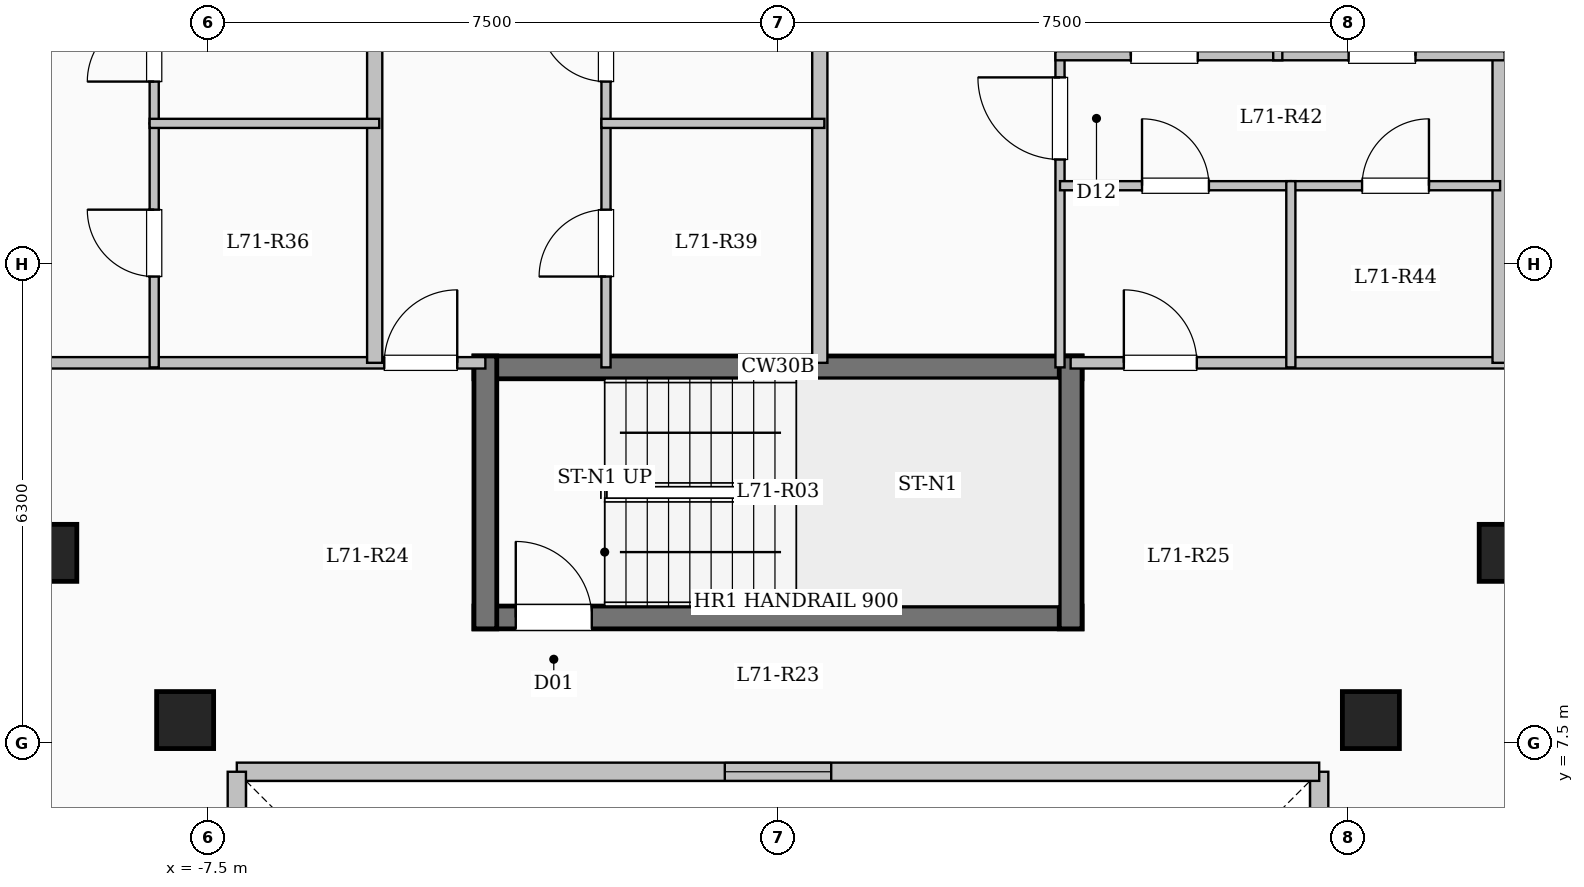
"""IFC4 building model, lengths in metres.
Left out: names, types, materials, properties, quantities, classifications, styles, units other than length and angle.
Written with IfcOpenShell. Run it as: python <this file> out.ifc"""

import sys

from ifc_helpers import new_model, si_unit, direction, frame, frame_2d, origin, origin_2d, place, context, subcontext, project, spatial, rectangle, extrude, element, fill, save


model = new_model("IFC4")
c1 = context("Model", 3, precision=1e-05, world=origin(), true_north=direction((0.0, 1.0)))
c2 = subcontext(c1, "Body", "Model", "MODEL_VIEW")
j1 = project(units=[si_unit("LENGTHUNIT", "METRE"), si_unit("PLANEANGLEUNIT", "RADIAN")], contexts=[c1])
p1 = place(None, origin())
s1 = spatial("IfcSite", under=j1, at=p1, CompositionType="ELEMENT")
p2 = place(p1, origin())
s2 = spatial("IfcBuilding", under=s1, at=p2, CompositionType="ELEMENT")
p3 = place(p2, frame((0.0, 0.0, 261.6)))
s3 = spatial("IfcBuildingStorey", under=s2, at=p3, CompositionType="ELEMENT", Elevation=261.6)
for number, where, z_axis, x_axis in (
    (1, (-7.8, 7.8, 0.0), (0.0, 0.0, 1.0), (1.0, 0.0, 0.0)),
    (2, (7.8, 7.8, 0.0), (0.0, 0.0, 1.0), (1.0, 0.0, 0.0)),
    (3, (-9.6, 10.0, 0.0), (0.0, 0.0, 1.0), (1.0, 0.0, 0.0)),
    (4, (9.6, 10.0, 0.0), (0.0, 0.0, 1.0), (1.0, 0.0, 0.0)),
):
    element("IfcColumn", number, at=place(p3, frame(where, z_axis=z_axis, x_axis=x_axis)), inside=s3, PredefinedType="COLUMN", context=c2, shape_type="SweptSolid", body=[
        extrude(rectangle(XDim=0.75, YDim=0.75, at=origin_2d()), origin(), (0.0, 0.0, 1.0), 3.35),
    ])
p4 = place(p3, frame((7.12, -7.12, 0.0), z_axis=(0.0, 0.0, 1.0), x_axis=(0.0, 1.0, 0.0)))
e5 = element("IfcWall", 5, at=p4, inside=s3, PredefinedType="SOLIDWALL", context=c2, shape_type="SweptSolid", body=[
    extrude(rectangle(XDim=14.24, YDim=0.24, at=frame_2d((7.12, 0.0))), origin(), (0.0, 0.0, 1.0), 3.1),
])
p5 = place(p4, frame((6.42, 0.0, 0.95)))
e6 = element("IfcOpeningElement", 6, at=p5, cuts=e5, PredefinedType="OPENING", context=c2, shape_type="SweptSolid", body=[
    extrude(rectangle(XDim=1.4, YDim=1.5, at=frame_2d((0.7, 0.75))), frame((0.0, 0.13, 0.0), z_axis=(0.0, -1.0, 0.0), x_axis=(1.0, 0.0, 0.0)), (0.0, 0.0, 1.0), 0.26),
])
p6 = place(p3, frame((7.12, 7.12, 0.0), z_axis=(0.0, 0.0, 1.0), x_axis=(-1.0, 0.0, 0.0)))
e7 = element("IfcWall", 7, at=p6, inside=s3, PredefinedType="SOLIDWALL", context=c2, shape_type="SweptSolid", body=[
    extrude(rectangle(XDim=14.24, YDim=0.24, at=frame_2d((7.12, 0.0))), origin(), (0.0, 0.0, 1.0), 3.1),
])
p7 = place(p6, frame((6.42, 0.0, 0.95)))
e8 = element("IfcOpeningElement", 8, at=p7, cuts=e7, PredefinedType="OPENING", context=c2, shape_type="SweptSolid", body=[
    extrude(rectangle(XDim=1.4, YDim=1.5, at=frame_2d((0.7, 0.75))), frame((0.0, 0.13, 0.0), z_axis=(0.0, -1.0, 0.0), x_axis=(1.0, 0.0, 0.0)), (0.0, 0.0, 1.0), 0.26),
])
p8 = place(p3, frame((-7.12, 7.12, 0.0), z_axis=(0.0, 0.0, 1.0), x_axis=(0.0, -1.0, 0.0)))
e9 = element("IfcWall", 9, at=p8, inside=s3, PredefinedType="SOLIDWALL", context=c2, shape_type="SweptSolid", body=[
    extrude(rectangle(XDim=14.24, YDim=0.24, at=frame_2d((7.12, 0.0))), origin(), (0.0, 0.0, 1.0), 3.1),
])
p9 = place(p8, frame((6.42, 0.0, 0.95)))
e10 = element("IfcOpeningElement", 10, at=p9, cuts=e9, PredefinedType="OPENING", context=c2, shape_type="SweptSolid", body=[
    extrude(rectangle(XDim=1.4, YDim=1.5, at=frame_2d((0.7, 0.75))), frame((0.0, 0.13, 0.0), z_axis=(0.0, -1.0, 0.0), x_axis=(1.0, 0.0, 0.0)), (0.0, 0.0, 1.0), 0.26),
])
p10 = place(p3, frame((-4.0, 12.44, 0.0), z_axis=(0.0, 0.0, 1.0), x_axis=(1.0, 0.0, 0.0)))
e11 = element("IfcWall", 11, at=p10, inside=s3, PredefinedType="SHEAR", context=c2, shape_type="SweptSolid", body=[
    extrude(rectangle(XDim=8.0, YDim=0.3, at=frame_2d((4.0, 0.0))), origin(), (0.0, 0.0, 1.0), 3.35),
])
p11 = place(p3, frame((-4.0, 9.15, 0.0), z_axis=(0.0, 0.0, 1.0), x_axis=(1.0, 0.0, 0.0)))
e12 = element("IfcWall", 12, at=p11, inside=s3, PredefinedType="SHEAR", context=c2, shape_type="SweptSolid", body=[
    extrude(rectangle(XDim=8.0, YDim=0.3, at=frame_2d((4.0, 0.0))), origin(), (0.0, 0.0, 1.0), 3.35),
])
p12 = place(p11, frame((0.55, 0.0, 0.0)))
e13 = element("IfcOpeningElement", 13, at=p12, cuts=e12, PredefinedType="OPENING", context=c2, shape_type="SweptSolid", body=[
    extrude(rectangle(XDim=1.0, YDim=2.15, at=frame_2d((0.5, 1.075))), frame((0.0, 0.16, 0.0), z_axis=(0.0, -1.0, 0.0), x_axis=(1.0, 0.0, 0.0)), (0.0, 0.0, 1.0), 0.32),
])
for number, where, z_axis, x_axis in (
    (14, (-3.85, 9.0, 0.0), (0.0, 0.0, 1.0), (0.0, 1.0, 0.0)),
    (15, (3.85, 9.0, 0.0), (0.0, 0.0, 1.0), (0.0, 1.0, 0.0)),
):
    element("IfcWall", number, at=place(p3, frame(where, z_axis=z_axis, x_axis=x_axis)), inside=s3, PredefinedType="SHEAR", context=c2, shape_type="SweptSolid", body=[
        extrude(rectangle(XDim=3.59, YDim=0.3, at=frame_2d((1.795, 0.0))), origin(), (0.0, 0.0, 1.0), 3.35),
    ])
p13 = place(p3, frame((-17.75, 12.5, 0.0), z_axis=(0.0, 0.0, 1.0), x_axis=(1.0, 0.0, 0.0)))
e16 = element("IfcWall", 16, at=p13, inside=s3, PredefinedType="PARTITIONING", context=c2, shape_type="SweptSolid", body=[
    extrude(rectangle(XDim=13.9, YDim=0.15, at=frame_2d((6.95, 0.0))), origin(), (0.0, 0.0, 1.0), 3.1),
])
p14 = place(p13, frame((0.7, 0.0, 0.0)))
e17 = element("IfcOpeningElement", 17, at=p14, cuts=e16, PredefinedType="OPENING", context=c2, shape_type="SweptSolid", body=[
    extrude(rectangle(XDim=0.96, YDim=2.15, at=frame_2d((0.48, 1.075))), frame((0.0, 0.085, 0.0), z_axis=(0.0, -1.0, 0.0), x_axis=(1.0, 0.0, 0.0)), (0.0, 0.0, 1.0), 0.17),
])
p15 = place(p13, frame((7.105, 0.0, 0.0)))
e18 = element("IfcOpeningElement", 18, at=p15, cuts=e16, PredefinedType="OPENING", context=c2, shape_type="SweptSolid", body=[
    extrude(rectangle(XDim=0.96, YDim=2.15, at=frame_2d((0.48, 1.075))), frame((0.0, 0.085, 0.0), z_axis=(0.0, -1.0, 0.0), x_axis=(1.0, 0.0, 0.0)), (0.0, 0.0, 1.0), 0.17),
])
p16 = place(p13, frame((12.57, 0.0, 0.0)))
e19 = element("IfcOpeningElement", 19, at=p16, cuts=e16, PredefinedType="OPENING", context=c2, shape_type="SweptSolid", body=[
    extrude(rectangle(XDim=0.96, YDim=2.15, at=frame_2d((0.48, 1.075))), frame((0.0, 0.085, 0.0), z_axis=(0.0, -1.0, 0.0), x_axis=(1.0, 0.0, 0.0)), (0.0, 0.0, 1.0), 0.17),
])
p17 = place(p3, frame((3.85, 12.5, 0.0), z_axis=(0.0, 0.0, 1.0), x_axis=(1.0, 0.0, 0.0)))
e20 = element("IfcWall", 20, at=p17, inside=s3, PredefinedType="PARTITIONING", context=c2, shape_type="SweptSolid", body=[
    extrude(rectangle(XDim=13.9, YDim=0.15, at=frame_2d((6.95, 0.0))), origin(), (0.0, 0.0, 1.0), 3.1),
])
p18 = place(p17, frame((0.7, 0.0, 0.0)))
e21 = element("IfcOpeningElement", 21, at=p18, cuts=e20, PredefinedType="OPENING", context=c2, shape_type="SweptSolid", body=[
    extrude(rectangle(XDim=0.96, YDim=2.15, at=frame_2d((0.48, 1.075))), frame((0.0, 0.085, 0.0), z_axis=(0.0, -1.0, 0.0), x_axis=(1.0, 0.0, 0.0)), (0.0, 0.0, 1.0), 0.17),
])
p19 = place(p17, frame((6.35, 0.0, 0.0)))
e22 = element("IfcOpeningElement", 22, at=p19, cuts=e20, PredefinedType="OPENING", context=c2, shape_type="SweptSolid", body=[
    extrude(rectangle(XDim=0.96, YDim=2.15, at=frame_2d((0.48, 1.075))), frame((0.0, 0.085, 0.0), z_axis=(0.0, -1.0, 0.0), x_axis=(1.0, 0.0, 0.0)), (0.0, 0.0, 1.0), 0.17),
])
p20 = place(p3, frame((0.55, 12.5, 0.0), z_axis=(0.0, 0.0, 1.0), x_axis=(0.0, 1.0, 0.0)))
e23 = element("IfcWall", 23, at=p20, inside=s3, PredefinedType="SOLIDWALL", context=c2, shape_type="SweptSolid", body=[
    extrude(rectangle(XDim=9.88, YDim=0.2, at=frame_2d((4.94, 0.0))), origin(), (0.0, 0.0, 1.0), 3.1),
])
p21 = place(p3, frame((-5.306, 12.5, 0.0), z_axis=(0.0, 0.0, 1.0), x_axis=(0.0, 1.0, 0.0)))
e24 = element("IfcWall", 24, at=p21, inside=s3, PredefinedType="SOLIDWALL", context=c2, shape_type="SweptSolid", body=[
    extrude(rectangle(XDim=9.805, YDim=0.2, at=frame_2d((4.902, 0.0))), origin(), (0.0, 0.0, 1.0), 3.1),
])
p22 = place(p3, frame((-8.207, 12.44, 0.0), z_axis=(0.0, 0.0, 1.0), x_axis=(0.0, 1.0, 0.0)))
e25 = element("IfcWall", 25, at=p22, inside=s3, PredefinedType="PARTITIONING", context=c2, shape_type="SweptSolid", body=[
    extrude(rectangle(XDim=3.21, YDim=0.12, at=frame_2d((1.605, 0.0))), origin(), (0.0, 0.0, 1.0), 3.1),
])
p23 = place(p22, frame((1.195, 0.0, 0.0)))
e26 = element("IfcOpeningElement", 26, at=p23, cuts=e25, PredefinedType="OPENING", context=c2, shape_type="SweptSolid", body=[
    extrude(rectangle(XDim=0.88, YDim=2.1, at=frame_2d((0.44, 1.05))), frame((0.0, 0.07, 0.0), z_axis=(0.0, -1.0, 0.0), x_axis=(1.0, 0.0, 0.0)), (0.0, 0.0, 1.0), 0.14),
])
p24 = place(p3, frame((-8.207, 15.65, 0.0), z_axis=(0.0, 0.0, 1.0), x_axis=(0.0, 1.0, 0.0)))
e27 = element("IfcWall", 27, at=p24, inside=s3, PredefinedType="PARTITIONING", context=c2, shape_type="SweptSolid", body=[
    extrude(rectangle(XDim=5.939, YDim=0.12, at=frame_2d((2.97, 0.0))), origin(), (0.0, 0.0, 1.0), 3.1),
])
p25 = place(p24, frame((0.55, 0.0, 0.0)))
e28 = element("IfcOpeningElement", 28, at=p25, cuts=e27, PredefinedType="OPENING", context=c2, shape_type="SweptSolid", body=[
    extrude(rectangle(XDim=0.88, YDim=2.1, at=frame_2d((0.44, 1.05))), frame((0.0, 0.07, 0.0), z_axis=(0.0, -1.0, 0.0), x_axis=(1.0, 0.0, 0.0)), (0.0, 0.0, 1.0), 0.14),
])
p26 = place(p3, frame((-8.267, 15.65, 0.0), z_axis=(0.0, 0.0, 1.0), x_axis=(1.0, 0.0, 0.0)))
e29 = element("IfcWall", 29, at=p26, inside=s3, PredefinedType="PARTITIONING", context=c2, shape_type="SweptSolid", body=[
    extrude(rectangle(XDim=3.021, YDim=0.12, at=frame_2d((1.51, 0.0))), origin(), (0.0, 0.0, 1.0), 2.785),
])
p27 = place(p3, frame((-2.263, 12.44, 0.0), z_axis=(0.0, 0.0, 1.0), x_axis=(0.0, 1.0, 0.0)))
e30 = element("IfcWall", 30, at=p27, inside=s3, PredefinedType="PARTITIONING", context=c2, shape_type="SweptSolid", body=[
    extrude(rectangle(XDim=3.21, YDim=0.12, at=frame_2d((1.605, 0.0))), origin(), (0.0, 0.0, 1.0), 3.1),
])
p28 = place(p27, frame((1.195, 0.0, 0.0)))
e31 = element("IfcOpeningElement", 31, at=p28, cuts=e30, PredefinedType="OPENING", context=c2, shape_type="SweptSolid", body=[
    extrude(rectangle(XDim=0.88, YDim=2.1, at=frame_2d((0.44, 1.05))), frame((0.0, 0.07, 0.0), z_axis=(0.0, -1.0, 0.0), x_axis=(1.0, 0.0, 0.0)), (0.0, 0.0, 1.0), 0.14),
])
p29 = place(p3, frame((-2.263, 15.65, 0.0), z_axis=(0.0, 0.0, 1.0), x_axis=(0.0, 1.0, 0.0)))
e32 = element("IfcWall", 32, at=p29, inside=s3, PredefinedType="PARTITIONING", context=c2, shape_type="SweptSolid", body=[
    extrude(rectangle(XDim=6.73, YDim=0.12, at=frame_2d((3.365, 0.0))), origin(), (0.0, 0.0, 1.0), 3.1),
])
p30 = place(p29, frame((0.55, 0.0, 0.0)))
e33 = element("IfcOpeningElement", 33, at=p30, cuts=e32, PredefinedType="OPENING", context=c2, shape_type="SweptSolid", body=[
    extrude(rectangle(XDim=0.88, YDim=2.1, at=frame_2d((0.44, 1.05))), frame((0.0, 0.07, 0.0), z_axis=(0.0, -1.0, 0.0), x_axis=(1.0, 0.0, 0.0)), (0.0, 0.0, 1.0), 0.14),
])
p31 = place(p3, frame((-2.323, 15.65, 0.0), z_axis=(0.0, 0.0, 1.0), x_axis=(1.0, 0.0, 0.0)))
e34 = element("IfcWall", 34, at=p31, inside=s3, PredefinedType="PARTITIONING", context=c2, shape_type="SweptSolid", body=[
    extrude(rectangle(XDim=2.933, YDim=0.12, at=frame_2d((1.467, 0.0))), origin(), (0.0, 0.0, 1.0), 2.785),
])
p32 = place(p3, frame((9.5, 12.5, 0.0), z_axis=(0.0, 0.0, 1.0), x_axis=(0.0, 1.0, 0.0)))
e35 = element("IfcWall", 35, at=p32, inside=s3, PredefinedType="SOLIDWALL", context=c2, shape_type="SweptSolid", body=[
    extrude(rectangle(XDim=8.77, YDim=0.2, at=frame_2d((4.385, 0.0))), origin(), (0.0, 0.0, 1.0), 3.1),
])
p33 = place(p3, frame((3.71, 12.44, 0.0), z_axis=(0.0, 0.0, 1.0), x_axis=(0.0, 1.0, 0.0)))
e36 = element("IfcWall", 36, at=p33, inside=s3, PredefinedType="PARTITIONING", context=c2, shape_type="SweptSolid", body=[
    extrude(rectangle(XDim=9.94, YDim=0.12, at=frame_2d((4.97, 0.0))), origin(), (0.0, 0.0, 1.0), 3.1),
])
p34 = place(p33, frame((2.735, 0.0, 0.0)))
e37 = element("IfcOpeningElement", 37, at=p34, cuts=e36, PredefinedType="OPENING", context=c2, shape_type="SweptSolid", body=[
    extrude(rectangle(XDim=1.08, YDim=2.15, at=frame_2d((0.54, 1.075))), frame((0.0, 0.07, 0.0), z_axis=(0.0, -1.0, 0.0), x_axis=(1.0, 0.0, 0.0)), (0.0, 0.0, 1.0), 0.14),
])
p35 = place(p3, frame((3.71, 14.83, 0.0), z_axis=(0.0, 0.0, 1.0), x_axis=(1.0, 0.0, 0.0)))
e38 = element("IfcWall", 38, at=p35, inside=s3, PredefinedType="PARTITIONING", context=c2, shape_type="SweptSolid", body=[
    extrude(rectangle(XDim=3.037, YDim=0.12, at=frame_2d((1.519, 0.0))), origin(), (0.0, 0.0, 1.0), 3.1),
])
p36 = place(p35, frame((1.079, 0.0, 0.0)))
e39 = element("IfcOpeningElement", 39, at=p36, cuts=e38, PredefinedType="OPENING", context=c2, shape_type="SweptSolid", body=[
    extrude(rectangle(XDim=0.88, YDim=2.1, at=frame_2d((0.44, 1.05))), frame((0.0, 0.07, 0.0), z_axis=(0.0, -1.0, 0.0), x_axis=(1.0, 0.0, 0.0)), (0.0, 0.0, 1.0), 0.14),
])
p37 = place(p3, frame((6.747, 14.83, 0.0), z_axis=(0.0, 0.0, 1.0), x_axis=(1.0, 0.0, 0.0)))
e40 = element("IfcWall", 40, at=p37, inside=s3, PredefinedType="PARTITIONING", context=c2, shape_type="SweptSolid", body=[
    extrude(rectangle(XDim=2.753, YDim=0.12, at=frame_2d((1.376, 0.0))), origin(), (0.0, 0.0, 1.0), 3.1),
])
p38 = place(p37, frame((0.937, 0.0, 0.0)))
e41 = element("IfcOpeningElement", 41, at=p38, cuts=e40, PredefinedType="OPENING", context=c2, shape_type="SweptSolid", body=[
    extrude(rectangle(XDim=0.88, YDim=2.1, at=frame_2d((0.44, 1.05))), frame((0.0, 0.07, 0.0), z_axis=(0.0, -1.0, 0.0), x_axis=(1.0, 0.0, 0.0)), (0.0, 0.0, 1.0), 0.14),
])
p39 = place(p3, frame((3.65, 16.54, 0.0), z_axis=(0.0, 0.0, 1.0), x_axis=(1.0, 0.0, 0.0)))
e42 = element("IfcWall", 42, at=p39, inside=s3, PredefinedType="PARTITIONING", context=c2, shape_type="SweptSolid", body=[
    extrude(rectangle(XDim=5.91, YDim=0.12, at=frame_2d((2.955, 0.0))), origin(), (0.0, 0.0, 1.0), 3.1),
])
p40 = place(p39, frame((0.992, 0.0, 0.0)))
e43 = element("IfcOpeningElement", 43, at=p40, cuts=e42, PredefinedType="OPENING", context=c2, shape_type="SweptSolid", body=[
    extrude(rectangle(XDim=0.88, YDim=2.1, at=frame_2d((0.44, 1.05))), frame((0.0, 0.07, 0.0), z_axis=(0.0, -1.0, 0.0), x_axis=(1.0, 0.0, 0.0)), (0.0, 0.0, 1.0), 0.14),
])
p41 = place(p39, frame((3.857, 0.0, 0.0)))
e44 = element("IfcOpeningElement", 44, at=p41, cuts=e42, PredefinedType="OPENING", context=c2, shape_type="SweptSolid", body=[
    extrude(rectangle(XDim=0.88, YDim=2.1, at=frame_2d((0.44, 1.05))), frame((0.0, 0.07, 0.0), z_axis=(0.0, -1.0, 0.0), x_axis=(1.0, 0.0, 0.0)), (0.0, 0.0, 1.0), 0.14),
])
p42 = place(p3, frame((6.747, 12.44, 0.0), z_axis=(0.0, 0.0, 1.0), x_axis=(0.0, 1.0, 0.0)))
e45 = element("IfcWall", 45, at=p42, inside=s3, PredefinedType="PARTITIONING", context=c2, shape_type="SweptSolid", body=[
    extrude(rectangle(XDim=2.45, YDim=0.12, at=frame_2d((1.225, 0.0))), origin(), (0.0, 0.0, 1.0), 3.1),
])
p43 = place(p3, frame((6.575, 16.48, 0.0), z_axis=(0.0, 0.0, 1.0), x_axis=(0.0, 1.0, 0.0)))
e46 = element("IfcWall", 46, at=p43, inside=s3, PredefinedType="PARTITIONING", context=c2, shape_type="SweptSolid", body=[
    extrude(rectangle(XDim=5.511, YDim=0.12, at=frame_2d((2.755, 0.0))), origin(), (0.0, 0.0, 1.0), 3.1),
])
p44 = place(p7, origin())
e47 = element("IfcWindow", 47, at=p44, inside=s3, PartitioningType="SINGLE_PANEL", PredefinedType="WINDOW", context=c2, shape_type="SweptSolid", body=[
    extrude(rectangle(XDim=1.4, YDim=1.5, at=frame_2d((0.7, 0.75))), frame((0.0, 0.03, 0.0), z_axis=(0.0, -1.0, 0.0), x_axis=(1.0, 0.0, 0.0)), (0.0, 0.0, 1.0), 0.06),
])
fill(e8, e47)
p45 = place(p12, origin())
e48 = element("IfcDoor", 48, at=p45, inside=s3, OperationType="SINGLE_SWING_LEFT", PredefinedType="DOOR", context=c2, shape_type="SweptSolid", body=[
    extrude(rectangle(XDim=1.0, YDim=2.15, at=frame_2d((0.5, 1.075))), frame((0.0, 0.025, 0.0), z_axis=(0.0, -1.0, 0.0), x_axis=(1.0, 0.0, 0.0)), (0.0, 0.0, 1.0), 0.05),
])
fill(e13, e48)
p46 = place(p23, origin())
e49 = element("IfcDoor", 49, at=p46, inside=s3, OperationType="SINGLE_SWING_RIGHT", PredefinedType="DOOR", context=c2, shape_type="SweptSolid", body=[
    extrude(rectangle(XDim=0.88, YDim=2.1, at=frame_2d((0.44, 1.05))), frame((0.0, 0.025, 0.0), z_axis=(0.0, -1.0, 0.0), x_axis=(1.0, 0.0, 0.0)), (0.0, 0.0, 1.0), 0.05),
])
fill(e26, e49)
p47 = place(p25, origin())
e50 = element("IfcDoor", 50, at=p47, inside=s3, OperationType="SINGLE_SWING_LEFT", PredefinedType="DOOR", context=c2, shape_type="SweptSolid", body=[
    extrude(rectangle(XDim=0.88, YDim=2.1, at=frame_2d((0.44, 1.05))), frame((0.0, 0.025, 0.0), z_axis=(0.0, -1.0, 0.0), x_axis=(1.0, 0.0, 0.0)), (0.0, 0.0, 1.0), 0.05),
])
fill(e28, e50)
p48 = place(p16, origin())
e51 = element("IfcDoor", 51, at=p48, inside=s3, OperationType="SINGLE_SWING_RIGHT", PredefinedType="DOOR", context=c2, shape_type="SweptSolid", body=[
    extrude(rectangle(XDim=0.96, YDim=2.15, at=frame_2d((0.48, 1.075))), frame((0.0, 0.025, 0.0), z_axis=(0.0, -1.0, 0.0), x_axis=(1.0, 0.0, 0.0)), (0.0, 0.0, 1.0), 0.05),
])
fill(e19, e51)
p49 = place(p28, origin())
e52 = element("IfcDoor", 52, at=p49, inside=s3, OperationType="SINGLE_SWING_LEFT", PredefinedType="DOOR", context=c2, shape_type="SweptSolid", body=[
    extrude(rectangle(XDim=0.88, YDim=2.1, at=frame_2d((0.44, 1.05))), frame((0.0, 0.025, 0.0), z_axis=(0.0, -1.0, 0.0), x_axis=(1.0, 0.0, 0.0)), (0.0, 0.0, 1.0), 0.05),
])
fill(e31, e52)
p50 = place(p30, origin())
e53 = element("IfcDoor", 53, at=p50, inside=s3, OperationType="SINGLE_SWING_RIGHT", PredefinedType="DOOR", context=c2, shape_type="SweptSolid", body=[
    extrude(rectangle(XDim=0.88, YDim=2.1, at=frame_2d((0.44, 1.05))), frame((0.0, 0.025, 0.0), z_axis=(0.0, -1.0, 0.0), x_axis=(1.0, 0.0, 0.0)), (0.0, 0.0, 1.0), 0.05),
])
fill(e33, e53)
p51 = place(p18, origin())
e54 = element("IfcDoor", 54, at=p51, inside=s3, OperationType="SINGLE_SWING_LEFT", PredefinedType="DOOR", context=c2, shape_type="SweptSolid", body=[
    extrude(rectangle(XDim=0.96, YDim=2.15, at=frame_2d((0.48, 1.075))), frame((0.0, 0.025, 0.0), z_axis=(0.0, -1.0, 0.0), x_axis=(1.0, 0.0, 0.0)), (0.0, 0.0, 1.0), 0.05),
])
fill(e21, e54)
p52 = place(p34, origin())
e55 = element("IfcDoor", 55, at=p52, inside=s3, OperationType="SINGLE_SWING_RIGHT", PredefinedType="DOOR", context=c2, shape_type="SweptSolid", body=[
    extrude(rectangle(XDim=1.08, YDim=2.15, at=frame_2d((0.54, 1.075))), frame((0.0, 0.025, 0.0), z_axis=(0.0, -1.0, 0.0), x_axis=(1.0, 0.0, 0.0)), (0.0, 0.0, 1.0), 0.05),
])
fill(e37, e55)
p53 = place(p36, origin())
e56 = element("IfcDoor", 56, at=p53, inside=s3, OperationType="SINGLE_SWING_LEFT", PredefinedType="DOOR", context=c2, shape_type="SweptSolid", body=[
    extrude(rectangle(XDim=0.88, YDim=2.1, at=frame_2d((0.44, 1.05))), frame((0.0, 0.025, 0.0), z_axis=(0.0, -1.0, 0.0), x_axis=(1.0, 0.0, 0.0)), (0.0, 0.0, 1.0), 0.05),
])
fill(e39, e56)
p54 = place(p38, origin())
e57 = element("IfcDoor", 57, at=p54, inside=s3, OperationType="SINGLE_SWING_RIGHT", PredefinedType="DOOR", context=c2, shape_type="SweptSolid", body=[
    extrude(rectangle(XDim=0.88, YDim=2.1, at=frame_2d((0.44, 1.05))), frame((0.0, 0.025, 0.0), z_axis=(0.0, -1.0, 0.0), x_axis=(1.0, 0.0, 0.0)), (0.0, 0.0, 1.0), 0.05),
])
fill(e41, e57)
p55 = place(p40, origin())
e58 = element("IfcDoor", 58, at=p55, inside=s3, OperationType="SINGLE_SWING_LEFT", PredefinedType="DOOR", context=c2, shape_type="SweptSolid", body=[
    extrude(rectangle(XDim=0.88, YDim=2.1, at=frame_2d((0.44, 1.05))), frame((0.0, 0.025, 0.0), z_axis=(0.0, -1.0, 0.0), x_axis=(1.0, 0.0, 0.0)), (0.0, 0.0, 1.0), 0.05),
])
fill(e43, e58)
p56 = place(p41, origin())
e59 = element("IfcDoor", 59, at=p56, inside=s3, OperationType="SINGLE_SWING_RIGHT", PredefinedType="DOOR", context=c2, shape_type="SweptSolid", body=[
    extrude(rectangle(XDim=0.88, YDim=2.1, at=frame_2d((0.44, 1.05))), frame((0.0, 0.025, 0.0), z_axis=(0.0, -1.0, 0.0), x_axis=(1.0, 0.0, 0.0)), (0.0, 0.0, 1.0), 0.05),
])
fill(e44, e59)
save(model, sys.argv[1])
